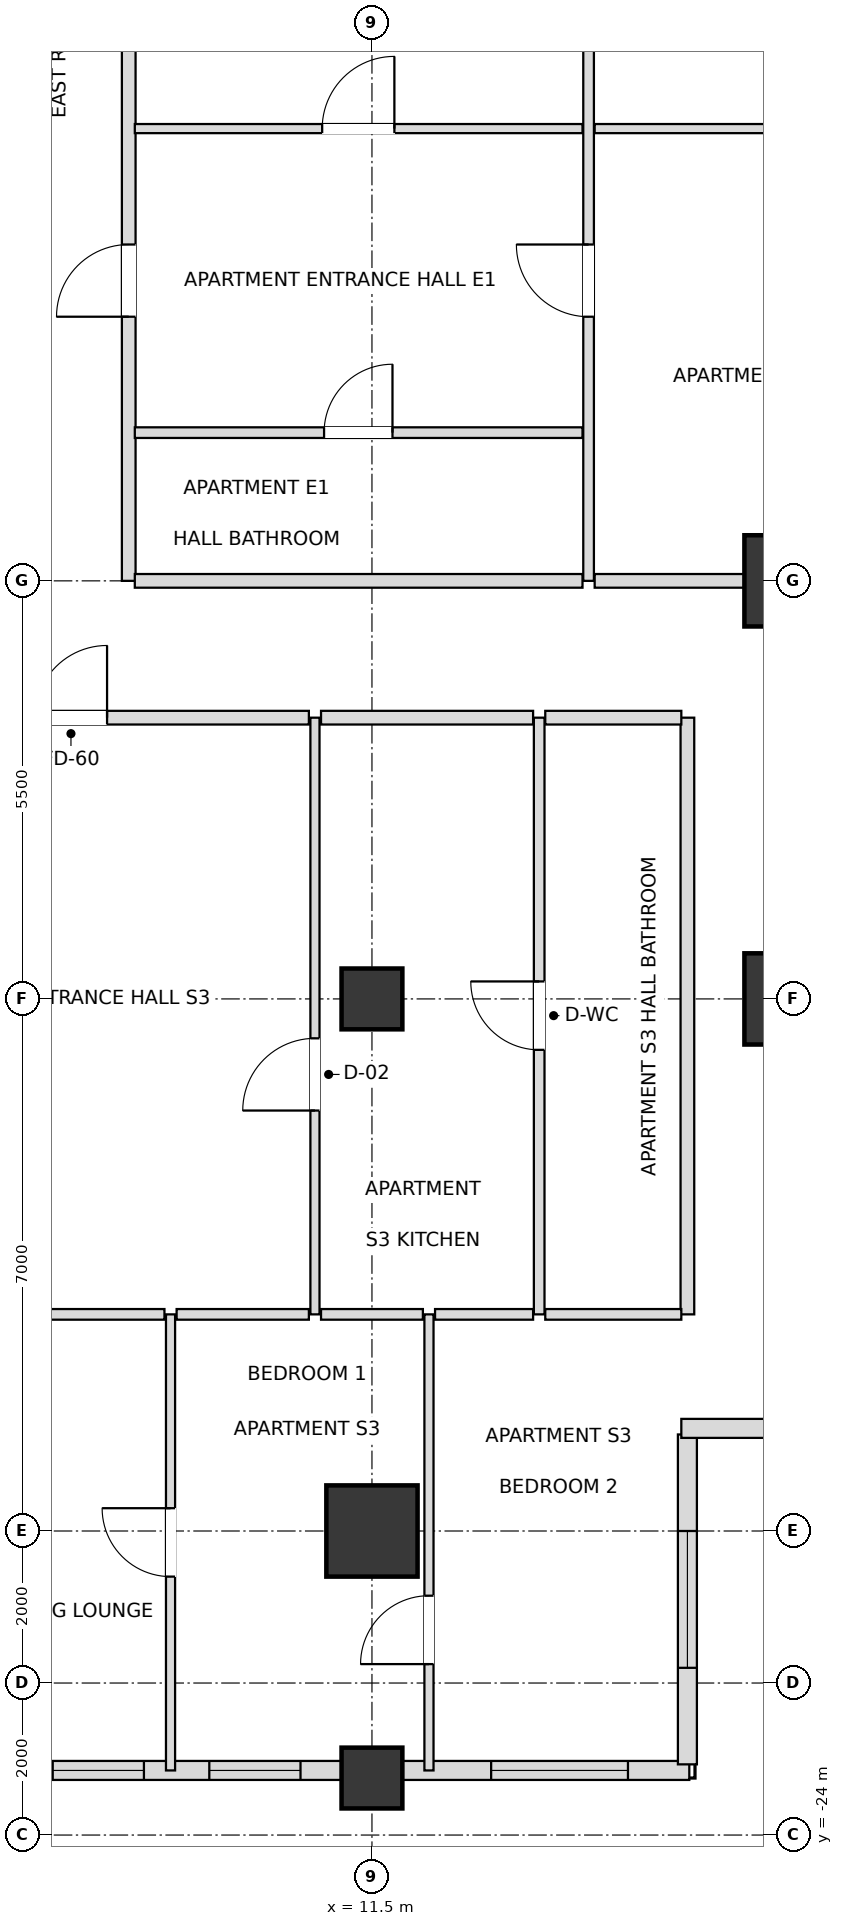
"""IFC4 building model, lengths in metres.
Left out: names, types, materials, properties, quantities, classifications, styles, units other than length and angle.
Written with IfcOpenShell. Run it as: python <this file> out.ifc"""

import sys

from ifc_helpers import new_model, si_unit, direction, frame, frame_2d, origin, origin_2d, place, context, subcontext, project, spatial, rectangle, extrude, element, fill, save


model = new_model("IFC4")
c1 = context("Model", 3, precision=1e-05, world=origin(), true_north=direction((0.0, 1.0)))
c2 = subcontext(c1, "Body", "Model", "MODEL_VIEW")
j1 = project(units=[si_unit("LENGTHUNIT", "METRE"), si_unit("PLANEANGLEUNIT", "RADIAN")], contexts=[c1])
p1 = place(None, origin())
s1 = spatial("IfcSite", under=j1, at=p1, CompositionType="ELEMENT")
p2 = place(p1, origin())
s2 = spatial("IfcBuilding", under=s1, at=p2, CompositionType="ELEMENT")
p3 = place(p2, frame((0.0, 0.0, 117.0)))
s3 = spatial("IfcBuildingStorey", under=s2, at=p3, CompositionType="ELEMENT", Elevation=117.0)
for number, where, z_axis, x_axis in (
    (1, (11.5, -20.0, 0.0), (0.0, 0.0, 1.0), (1.0, 0.0, 0.0)),
    (2, (17.0, -13.0, 0.0), (0.0, 0.0, 1.0), (1.0, 0.0, 0.0)),
    (3, (17.0, -7.5, 0.0), (0.0, 0.0, 1.0), (1.0, 0.0, 0.0)),
):
    element("IfcColumn", number, at=place(p3, frame(where, z_axis=z_axis, x_axis=x_axis)), inside=s3, PredefinedType="USERDEFINED", context=c2, shape_type="SweptSolid", body=[
        extrude(rectangle(XDim=1.2, YDim=1.2, at=origin_2d()), origin(), (0.0, 0.0, 1.0), 3.6),
    ])
for number, where, z_axis, x_axis in (
    (4, (11.5, -13.0, 0.0), (0.0, 0.0, 1.0), (1.0, 0.0, 0.0)),
    (5, (11.5, -23.25, 0.0), (0.0, 0.0, 1.0), (1.0, 0.0, 0.0)),
):
    element("IfcColumn", number, at=place(p3, frame(where, z_axis=z_axis, x_axis=x_axis)), inside=s3, PredefinedType="COLUMN", context=c2, shape_type="SweptSolid", body=[
        extrude(rectangle(XDim=0.8, YDim=0.8, at=origin_2d()), origin(), (0.0, 0.0, 1.0), 3.6),
    ])
p4 = place(p3, frame((6.895, -23.15, 0.0), z_axis=(0.0, 0.0, 1.0), x_axis=(1.0, 0.0, 0.0)))
e6 = element("IfcWall", 6, at=p4, inside=s3, PredefinedType="SOLIDWALL", context=c2, shape_type="SweptSolid", body=[
    extrude(rectangle(XDim=4.21, YDim=0.25, at=frame_2d((2.105, 0.0))), origin(), (0.0, 0.0, 1.0), 2.656),
])
p5 = place(p4, frame((0.405, 0.0, 0.72)))
e7 = element("IfcOpeningElement", 7, at=p5, cuts=e6, PredefinedType="OPENING", context=c2, shape_type="SweptSolid", body=[
    extrude(rectangle(XDim=1.2, YDim=1.68, at=frame_2d((0.6, 0.84))), frame((0.0, 0.135, 0.0), z_axis=(0.0, -1.0, 0.0), x_axis=(1.0, 0.0, 0.0)), (0.0, 0.0, 1.0), 0.27),
])
p6 = place(p4, frame((2.465, 0.0, 0.72)))
e8 = element("IfcOpeningElement", 8, at=p6, cuts=e6, PredefinedType="OPENING", context=c2, shape_type="SweptSolid", body=[
    extrude(rectangle(XDim=1.2, YDim=1.68, at=frame_2d((0.6, 0.84))), frame((0.0, 0.135, 0.0), z_axis=(0.0, -1.0, 0.0), x_axis=(1.0, 0.0, 0.0)), (0.0, 0.0, 1.0), 0.27),
])
p7 = place(p3, frame((11.895, -23.15, 0.0), z_axis=(0.0, 0.0, 1.0), x_axis=(1.0, 0.0, 0.0)))
e9 = element("IfcWall", 9, at=p7, inside=s3, PredefinedType="SOLIDWALL", context=c2, shape_type="SweptSolid", body=[
    extrude(rectangle(XDim=3.78, YDim=0.25, at=frame_2d((1.89, 0.0))), origin(), (0.0, 0.0, 1.0), 2.656),
])
p8 = place(p7, frame((1.173, 0.0, 0.72)))
e10 = element("IfcOpeningElement", 10, at=p8, cuts=e9, PredefinedType="OPENING", context=c2, shape_type="SweptSolid", body=[
    extrude(rectangle(XDim=1.8, YDim=1.68, at=frame_2d((0.9, 0.84))), frame((0.0, 0.135, 0.0), z_axis=(0.0, -1.0, 0.0), x_axis=(1.0, 0.0, 0.0)), (0.0, 0.0, 1.0), 0.27),
])
p9 = place(p3, frame((15.65, -23.07, 0.0), z_axis=(0.0, 0.0, 1.0), x_axis=(0.0, 1.0, 0.0)))
e11 = element("IfcWall", 11, at=p9, inside=s3, PredefinedType="SOLIDWALL", context=c2, shape_type="SweptSolid", body=[
    extrude(rectangle(XDim=4.34, YDim=0.25, at=frame_2d((2.17, 0.0))), origin(), (0.0, 0.0, 1.0), 2.656),
])
p10 = place(p9, frame((1.27, 0.0, 0.72)))
e12 = element("IfcOpeningElement", 12, at=p10, cuts=e11, PredefinedType="OPENING", context=c2, shape_type="SweptSolid", body=[
    extrude(rectangle(XDim=1.8, YDim=1.68, at=frame_2d((0.9, 0.84))), frame((0.0, 0.135, 0.0), z_axis=(0.0, -1.0, 0.0), x_axis=(1.0, 0.0, 0.0)), (0.0, 0.0, 1.0), 0.27),
])
p11 = place(p3, frame((15.57, -18.65, 0.0), z_axis=(0.0, 0.0, 1.0), x_axis=(1.0, 0.0, 0.0)))
e13 = element("IfcWall", 13, at=p11, inside=s3, PredefinedType="SOLIDWALL", context=c2, shape_type="SweptSolid", body=[
    extrude(rectangle(XDim=4.66, YDim=0.25, at=frame_2d((2.33, 0.0))), origin(), (0.0, 0.0, 1.0), 2.656),
])
p12 = place(p11, frame((1.43, 0.0, 0.72)))
e14 = element("IfcOpeningElement", 14, at=p12, cuts=e13, PredefinedType="OPENING", context=c2, shape_type="SweptSolid", body=[
    extrude(rectangle(XDim=1.8, YDim=1.68, at=frame_2d((0.9, 0.84))), frame((0.0, 0.135, 0.0), z_axis=(0.0, -1.0, 0.0), x_axis=(1.0, 0.0, 0.0)), (0.0, 0.0, 1.0), 0.27),
])
p13 = place(p3, frame((8.3, -7.5, 0.0), z_axis=(0.0, 0.0, 1.0), x_axis=(0.0, 1.0, 0.0)))
e15 = element("IfcWall", 15, at=p13, inside=s3, PredefinedType="PARTITIONING", context=c2, shape_type="SweptSolid", body=[
    extrude(rectangle(XDim=15.0, YDim=0.18, at=frame_2d((7.5, 0.0))), origin(), (0.0, 0.0, 1.0), 3.3),
])
p14 = place(p13, frame((3.475, 0.0, 0.0)))
e16 = element("IfcOpeningElement", 16, at=p14, cuts=e15, PredefinedType="OPENING", context=c2, shape_type="SweptSolid", body=[
    extrude(rectangle(XDim=0.95, YDim=2.15, at=frame_2d((0.475, 1.075))), frame((0.0, 0.1, 0.0), z_axis=(0.0, -1.0, 0.0), x_axis=(1.0, 0.0, 0.0)), (0.0, 0.0, 1.0), 0.2),
])
p15 = place(p3, frame((8.85, -23.15, 0.0), z_axis=(0.0, 0.0, 1.0), x_axis=(0.0, 1.0, 0.0)))
e17 = element("IfcWall", 17, at=p15, inside=s3, PredefinedType="PARTITIONING", context=c2, shape_type="SweptSolid", body=[
    extrude(rectangle(XDim=6.0, YDim=0.12, at=frame_2d((3.0, 0.0))), origin(), (0.0, 0.0, 1.0), 2.736),
])
p16 = place(p15, frame((2.55, 0.0, 0.0)))
e18 = element("IfcOpeningElement", 18, at=p16, cuts=e17, PredefinedType="OPENING", context=c2, shape_type="SweptSolid", body=[
    extrude(rectangle(XDim=0.9, YDim=2.1, at=frame_2d((0.45, 1.05))), frame((0.0, 0.07, 0.0), z_axis=(0.0, -1.0, 0.0), x_axis=(1.0, 0.0, 0.0)), (0.0, 0.0, 1.0), 0.14),
])
p17 = place(p3, frame((10.75, -17.15, 0.0), z_axis=(0.0, 0.0, 1.0), x_axis=(0.0, 1.0, 0.0)))
e19 = element("IfcWall", 19, at=p17, inside=s3, PredefinedType="PARTITIONING", context=c2, shape_type="SweptSolid", body=[
    extrude(rectangle(XDim=7.85, YDim=0.12, at=frame_2d((3.925, 0.0))), origin(), (0.0, 0.0, 1.0), 2.736),
])
p18 = place(p17, frame((2.681, 0.0, 0.0)))
e20 = element("IfcOpeningElement", 20, at=p18, cuts=e19, PredefinedType="OPENING", context=c2, shape_type="SweptSolid", body=[
    extrude(rectangle(XDim=0.95, YDim=2.1, at=frame_2d((0.475, 1.05))), frame((0.0, 0.07, 0.0), z_axis=(0.0, -1.0, 0.0), x_axis=(1.0, 0.0, 0.0)), (0.0, 0.0, 1.0), 0.14),
])
p19 = place(p3, frame((12.25, -23.15, 0.0), z_axis=(0.0, 0.0, 1.0), x_axis=(0.0, 1.0, 0.0)))
e21 = element("IfcWall", 21, at=p19, inside=s3, PredefinedType="PARTITIONING", context=c2, shape_type="SweptSolid", body=[
    extrude(rectangle(XDim=6.0, YDim=0.12, at=frame_2d((3.0, 0.0))), origin(), (0.0, 0.0, 1.0), 2.656),
])
p20 = place(p19, frame((1.399, 0.0, 0.0)))
e22 = element("IfcOpeningElement", 22, at=p20, cuts=e21, PredefinedType="OPENING", context=c2, shape_type="SweptSolid", body=[
    extrude(rectangle(XDim=0.9, YDim=2.1, at=frame_2d((0.45, 1.05))), frame((0.0, 0.07, 0.0), z_axis=(0.0, -1.0, 0.0), x_axis=(1.0, 0.0, 0.0)), (0.0, 0.0, 1.0), 0.14),
])
p21 = place(p3, frame((13.7, -17.15, 0.0), z_axis=(0.0, 0.0, 1.0), x_axis=(0.0, 1.0, 0.0)))
e23 = element("IfcWall", 23, at=p21, inside=s3, PredefinedType="PARTITIONING", context=c2, shape_type="SweptSolid", body=[
    extrude(rectangle(XDim=7.85, YDim=0.14, at=frame_2d((3.925, 0.0))), origin(), (0.0, 0.0, 1.0), 2.656),
])
p22 = place(p21, frame((3.48, 0.0, 0.0)))
e24 = element("IfcOpeningElement", 24, at=p22, cuts=e23, PredefinedType="OPENING", context=c2, shape_type="SweptSolid", body=[
    extrude(rectangle(XDim=0.9, YDim=2.1, at=frame_2d((0.45, 1.05))), frame((0.0, 0.08, 0.0), z_axis=(0.0, -1.0, 0.0), x_axis=(1.0, 0.0, 0.0)), (0.0, 0.0, 1.0), 0.16),
])
p23 = place(p3, frame((14.35, -7.5, 0.0), z_axis=(0.0, 0.0, 1.0), x_axis=(0.0, 1.0, 0.0)))
e25 = element("IfcWall", 25, at=p23, inside=s3, PredefinedType="PARTITIONING", context=c2, shape_type="SweptSolid", body=[
    extrude(rectangle(XDim=15.0, YDim=0.14, at=frame_2d((7.5, 0.0))), origin(), (0.0, 0.0, 1.0), 3.3),
])
p24 = place(p23, frame((3.475, 0.0, 0.0)))
e26 = element("IfcOpeningElement", 26, at=p24, cuts=e25, PredefinedType="OPENING", context=c2, shape_type="SweptSolid", body=[
    extrude(rectangle(XDim=0.95, YDim=2.1, at=frame_2d((0.475, 1.05))), frame((0.0, 0.08, 0.0), z_axis=(0.0, -1.0, 0.0), x_axis=(1.0, 0.0, 0.0)), (0.0, 0.0, 1.0), 0.16),
])
p25 = place(p3, frame((15.65, -17.15, 0.0), z_axis=(0.0, 0.0, 1.0), x_axis=(0.0, 1.0, 0.0)))
e27 = element("IfcWall", 27, at=p25, inside=s3, PredefinedType="PARTITIONING", context=c2, shape_type="SweptSolid", body=[
    extrude(rectangle(XDim=7.85, YDim=0.18, at=frame_2d((3.925, 0.0))), origin(), (0.0, 0.0, 1.0), 2.656),
])
p26 = place(p3, frame((4.43, -17.15, 0.0), z_axis=(0.0, 0.0, 1.0), x_axis=(1.0, 0.0, 0.0)))
e28 = element("IfcWall", 28, at=p26, inside=s3, PredefinedType="PARTITIONING", context=c2, shape_type="SweptSolid", body=[
    extrude(rectangle(XDim=4.34, YDim=0.14, at=frame_2d((2.17, 0.0))), origin(), (0.0, 0.0, 1.0), 2.736),
])
p27 = place(p26, frame((1.685, 0.0, 0.0)))
e29 = element("IfcOpeningElement", 29, at=p27, cuts=e28, PredefinedType="OPENING", context=c2, shape_type="SweptSolid", body=[
    extrude(rectangle(XDim=0.95, YDim=2.1, at=frame_2d((0.475, 1.05))), frame((0.0, 0.08, 0.0), z_axis=(0.0, -1.0, 0.0), x_axis=(1.0, 0.0, 0.0)), (0.0, 0.0, 1.0), 0.16),
])
p28 = place(p3, frame((8.93, -17.15, 0.0), z_axis=(0.0, 0.0, 1.0), x_axis=(1.0, 0.0, 0.0)))
e30 = element("IfcWall", 30, at=p28, inside=s3, PredefinedType="PARTITIONING", context=c2, shape_type="SweptSolid", body=[
    extrude(rectangle(XDim=1.74, YDim=0.14, at=frame_2d((0.87, 0.0))), origin(), (0.0, 0.0, 1.0), 3.3),
])
p29 = place(p3, frame((10.83, -17.15, 0.0), z_axis=(0.0, 0.0, 1.0), x_axis=(1.0, 0.0, 0.0)))
e31 = element("IfcWall", 31, at=p29, inside=s3, PredefinedType="PARTITIONING", context=c2, shape_type="SweptSolid", body=[
    extrude(rectangle(XDim=1.34, YDim=0.14, at=frame_2d((0.67, 0.0))), origin(), (0.0, 0.0, 1.0), 2.656),
])
p30 = place(p3, frame((12.33, -17.15, 0.0), z_axis=(0.0, 0.0, 1.0), x_axis=(1.0, 0.0, 0.0)))
e32 = element("IfcWall", 32, at=p30, inside=s3, PredefinedType="PARTITIONING", context=c2, shape_type="SweptSolid", body=[
    extrude(rectangle(XDim=1.29, YDim=0.14, at=frame_2d((0.645, 0.0))), origin(), (0.0, 0.0, 1.0), 2.656),
])
p31 = place(p3, frame((13.78, -17.15, 0.0), z_axis=(0.0, 0.0, 1.0), x_axis=(1.0, 0.0, 0.0)))
e33 = element("IfcWall", 33, at=p31, inside=s3, PredefinedType="PARTITIONING", context=c2, shape_type="SweptSolid", body=[
    extrude(rectangle(XDim=1.79, YDim=0.14, at=frame_2d((0.895, 0.0))), origin(), (0.0, 0.0, 1.0), 2.656),
])
p32 = place(p3, frame((4.43, -9.3, 0.0), z_axis=(0.0, 0.0, 1.0), x_axis=(1.0, 0.0, 0.0)))
e34 = element("IfcWall", 34, at=p32, inside=s3, PredefinedType="PARTITIONING", context=c2, shape_type="SweptSolid", body=[
    extrude(rectangle(XDim=6.24, YDim=0.18, at=frame_2d((3.12, 0.0))), origin(), (0.0, 0.0, 1.0), 2.736),
])
p33 = place(p32, frame((2.635, 0.0, 0.0)))
e35 = element("IfcOpeningElement", 35, at=p33, cuts=e34, PredefinedType="OPENING", context=c2, shape_type="SweptSolid", body=[
    extrude(rectangle(XDim=0.95, YDim=2.15, at=frame_2d((0.475, 1.075))), frame((0.0, 0.1, 0.0), z_axis=(0.0, -1.0, 0.0), x_axis=(1.0, 0.0, 0.0)), (0.0, 0.0, 1.0), 0.2),
])
p34 = place(p3, frame((10.83, -9.3, 0.0), z_axis=(0.0, 0.0, 1.0), x_axis=(1.0, 0.0, 0.0)))
e36 = element("IfcWall", 36, at=p34, inside=s3, PredefinedType="PARTITIONING", context=c2, shape_type="SweptSolid", body=[
    extrude(rectangle(XDim=2.79, YDim=0.18, at=frame_2d((1.395, 0.0))), origin(), (0.0, 0.0, 1.0), 3.3),
])
p35 = place(p3, frame((13.78, -9.3, 0.0), z_axis=(0.0, 0.0, 1.0), x_axis=(1.0, 0.0, 0.0)))
e37 = element("IfcWall", 37, at=p35, inside=s3, PredefinedType="PARTITIONING", context=c2, shape_type="SweptSolid", body=[
    extrude(rectangle(XDim=1.79, YDim=0.18, at=frame_2d((0.895, 0.0))), origin(), (0.0, 0.0, 1.0), 3.3),
])
p36 = place(p3, frame((8.38, -7.5, 0.0), z_axis=(0.0, 0.0, 1.0), x_axis=(1.0, 0.0, 0.0)))
e38 = element("IfcWall", 38, at=p36, inside=s3, PredefinedType="PARTITIONING", context=c2, shape_type="SweptSolid", body=[
    extrude(rectangle(XDim=5.89, YDim=0.18, at=frame_2d((2.945, 0.0))), origin(), (0.0, 0.0, 1.0), 2.736),
])
p37 = place(p3, frame((14.43, -7.5, 0.0), z_axis=(0.0, 0.0, 1.0), x_axis=(1.0, 0.0, 0.0)))
e39 = element("IfcWall", 39, at=p37, inside=s3, PredefinedType="PARTITIONING", context=c2, shape_type="SweptSolid", body=[
    extrude(rectangle(XDim=5.72, YDim=0.18, at=frame_2d((2.86, 0.0))), origin(), (0.0, 0.0, 1.0), 2.736),
])
p38 = place(p3, frame((8.38, -5.55, 0.0), z_axis=(0.0, 0.0, 1.0), x_axis=(1.0, 0.0, 0.0)))
e40 = element("IfcWall", 40, at=p38, inside=s3, PredefinedType="PARTITIONING", context=c2, shape_type="SweptSolid", body=[
    extrude(rectangle(XDim=5.89, YDim=0.14, at=frame_2d((2.945, 0.0))), origin(), (0.0, 0.0, 1.0), 3.3),
])
p39 = place(p38, frame((2.49, 0.0, 0.0)))
e41 = element("IfcOpeningElement", 41, at=p39, cuts=e40, PredefinedType="OPENING", context=c2, shape_type="SweptSolid", body=[
    extrude(rectangle(XDim=0.9, YDim=2.1, at=frame_2d((0.45, 1.05))), frame((0.0, 0.08, 0.0), z_axis=(0.0, -1.0, 0.0), x_axis=(1.0, 0.0, 0.0)), (0.0, 0.0, 1.0), 0.16),
])
p40 = place(p3, frame((8.38, -1.55, 0.0), z_axis=(0.0, 0.0, 1.0), x_axis=(1.0, 0.0, 0.0)))
e42 = element("IfcWall", 42, at=p40, inside=s3, PredefinedType="PARTITIONING", context=c2, shape_type="SweptSolid", body=[
    extrude(rectangle(XDim=5.89, YDim=0.12, at=frame_2d((2.945, 0.0))), origin(), (0.0, 0.0, 1.0), 3.3),
])
p41 = place(p40, frame((2.465, 0.0, 0.0)))
e43 = element("IfcOpeningElement", 43, at=p41, cuts=e42, PredefinedType="OPENING", context=c2, shape_type="SweptSolid", body=[
    extrude(rectangle(XDim=0.95, YDim=2.1, at=frame_2d((0.475, 1.05))), frame((0.0, 0.07, 0.0), z_axis=(0.0, -1.0, 0.0), x_axis=(1.0, 0.0, 0.0)), (0.0, 0.0, 1.0), 0.14),
])
p42 = place(p3, frame((14.43, -1.55, 0.0), z_axis=(0.0, 0.0, 1.0), x_axis=(1.0, 0.0, 0.0)))
e44 = element("IfcWall", 44, at=p42, inside=s3, PredefinedType="PARTITIONING", context=c2, shape_type="SweptSolid", body=[
    extrude(rectangle(XDim=5.64, YDim=0.12, at=frame_2d((2.82, 0.0))), origin(), (0.0, 0.0, 1.0), 2.736),
])
p43 = place(p42, frame((2.37, 0.0, 0.0)))
e45 = element("IfcOpeningElement", 45, at=p43, cuts=e44, PredefinedType="OPENING", context=c2, shape_type="SweptSolid", body=[
    extrude(rectangle(XDim=0.9, YDim=2.1, at=frame_2d((0.45, 1.05))), frame((0.0, 0.07, 0.0), z_axis=(0.0, -1.0, 0.0), x_axis=(1.0, 0.0, 0.0)), (0.0, 0.0, 1.0), 0.14),
])
p44 = place(p5, origin())
e46 = element("IfcWindow", 46, at=p44, inside=s3, PartitioningType="SINGLE_PANEL", PredefinedType="WINDOW", context=c2, shape_type="SweptSolid", body=[
    extrude(rectangle(XDim=1.2, YDim=1.68, at=frame_2d((0.6, 0.84))), frame((0.0, 0.03, 0.0), z_axis=(0.0, -1.0, 0.0), x_axis=(1.0, 0.0, 0.0)), (0.0, 0.0, 1.0), 0.06),
])
fill(e7, e46)
p45 = place(p6, origin())
e47 = element("IfcWindow", 47, at=p45, inside=s3, PartitioningType="SINGLE_PANEL", PredefinedType="WINDOW", context=c2, shape_type="SweptSolid", body=[
    extrude(rectangle(XDim=1.2, YDim=1.68, at=frame_2d((0.6, 0.84))), frame((0.0, 0.03, 0.0), z_axis=(0.0, -1.0, 0.0), x_axis=(1.0, 0.0, 0.0)), (0.0, 0.0, 1.0), 0.06),
])
fill(e8, e47)
p46 = place(p8, origin())
e48 = element("IfcWindow", 48, at=p46, inside=s3, PartitioningType="SINGLE_PANEL", PredefinedType="WINDOW", context=c2, shape_type="SweptSolid", body=[
    extrude(rectangle(XDim=1.8, YDim=1.68, at=frame_2d((0.9, 0.84))), frame((0.0, 0.03, 0.0), z_axis=(0.0, -1.0, 0.0), x_axis=(1.0, 0.0, 0.0)), (0.0, 0.0, 1.0), 0.06),
])
fill(e10, e48)
p47 = place(p10, origin())
e49 = element("IfcWindow", 49, at=p47, inside=s3, PartitioningType="SINGLE_PANEL", PredefinedType="WINDOW", context=c2, shape_type="SweptSolid", body=[
    extrude(rectangle(XDim=1.8, YDim=1.68, at=frame_2d((0.9, 0.84))), frame((0.0, 0.03, 0.0), z_axis=(0.0, -1.0, 0.0), x_axis=(1.0, 0.0, 0.0)), (0.0, 0.0, 1.0), 0.06),
])
fill(e12, e49)
p48 = place(p33, origin())
e50 = element("IfcDoor", 50, at=p48, inside=s3, OperationType="SINGLE_SWING_RIGHT", PredefinedType="DOOR", context=c2, shape_type="SweptSolid", body=[
    extrude(rectangle(XDim=0.95, YDim=2.15, at=frame_2d((0.475, 1.075))), frame((0.0, 0.025, 0.0), z_axis=(0.0, -1.0, 0.0), x_axis=(1.0, 0.0, 0.0)), (0.0, 0.0, 1.0), 0.05),
])
fill(e35, e50)
p49 = place(p18, origin())
e51 = element("IfcDoor", 51, at=p49, inside=s3, OperationType="SINGLE_SWING_LEFT", PredefinedType="DOOR", context=c2, shape_type="SweptSolid", body=[
    extrude(rectangle(XDim=0.95, YDim=2.1, at=frame_2d((0.475, 1.05))), frame((0.0, 0.025, 0.0), z_axis=(0.0, -1.0, 0.0), x_axis=(1.0, 0.0, 0.0)), (0.0, 0.0, 1.0), 0.05),
])
fill(e20, e51)
p50 = place(p22, origin())
e52 = element("IfcDoor", 52, at=p50, inside=s3, OperationType="SINGLE_SWING_RIGHT", PredefinedType="DOOR", context=c2, shape_type="SweptSolid", body=[
    extrude(rectangle(XDim=0.9, YDim=2.1, at=frame_2d((0.45, 1.05))), frame((0.0, 0.025, 0.0), z_axis=(0.0, -1.0, 0.0), x_axis=(1.0, 0.0, 0.0)), (0.0, 0.0, 1.0), 0.05),
])
fill(e24, e52)
p51 = place(p16, origin())
e53 = element("IfcDoor", 53, at=p51, inside=s3, OperationType="SINGLE_SWING_RIGHT", PredefinedType="DOOR", context=c2, shape_type="SweptSolid", body=[
    extrude(rectangle(XDim=0.9, YDim=2.1, at=frame_2d((0.45, 1.05))), frame((0.0, 0.025, 0.0), z_axis=(0.0, -1.0, 0.0), x_axis=(1.0, 0.0, 0.0)), (0.0, 0.0, 1.0), 0.05),
])
fill(e18, e53)
p52 = place(p20, origin())
e54 = element("IfcDoor", 54, at=p52, inside=s3, OperationType="SINGLE_SWING_LEFT", PredefinedType="DOOR", context=c2, shape_type="SweptSolid", body=[
    extrude(rectangle(XDim=0.9, YDim=2.1, at=frame_2d((0.45, 1.05))), frame((0.0, 0.025, 0.0), z_axis=(0.0, -1.0, 0.0), x_axis=(1.0, 0.0, 0.0)), (0.0, 0.0, 1.0), 0.05),
])
fill(e22, e54)
p53 = place(p39, origin())
e55 = element("IfcDoor", 55, at=p53, inside=s3, OperationType="SINGLE_SWING_RIGHT", PredefinedType="DOOR", context=c2, shape_type="SweptSolid", body=[
    extrude(rectangle(XDim=0.9, YDim=2.1, at=frame_2d((0.45, 1.05))), frame((0.0, 0.025, 0.0), z_axis=(0.0, -1.0, 0.0), x_axis=(1.0, 0.0, 0.0)), (0.0, 0.0, 1.0), 0.05),
])
fill(e41, e55)
p54 = place(p14, origin())
e56 = element("IfcDoor", 56, at=p54, inside=s3, OperationType="SINGLE_SWING_LEFT", PredefinedType="DOOR", context=c2, shape_type="SweptSolid", body=[
    extrude(rectangle(XDim=0.95, YDim=2.15, at=frame_2d((0.475, 1.075))), frame((0.0, 0.025, 0.0), z_axis=(0.0, -1.0, 0.0), x_axis=(1.0, 0.0, 0.0)), (0.0, 0.0, 1.0), 0.05),
])
fill(e16, e56)
p55 = place(p41, origin())
e57 = element("IfcDoor", 57, at=p55, inside=s3, OperationType="SINGLE_SWING_RIGHT", PredefinedType="DOOR", context=c2, shape_type="SweptSolid", body=[
    extrude(rectangle(XDim=0.95, YDim=2.1, at=frame_2d((0.475, 1.05))), frame((0.0, 0.025, 0.0), z_axis=(0.0, -1.0, 0.0), x_axis=(1.0, 0.0, 0.0)), (0.0, 0.0, 1.0), 0.05),
])
fill(e43, e57)
p56 = place(p24, origin())
e58 = element("IfcDoor", 58, at=p56, inside=s3, OperationType="SINGLE_SWING_RIGHT", PredefinedType="DOOR", context=c2, shape_type="SweptSolid", body=[
    extrude(rectangle(XDim=0.95, YDim=2.1, at=frame_2d((0.475, 1.05))), frame((0.0, 0.025, 0.0), z_axis=(0.0, -1.0, 0.0), x_axis=(1.0, 0.0, 0.0)), (0.0, 0.0, 1.0), 0.05),
])
fill(e26, e58)
save(model, sys.argv[1])
